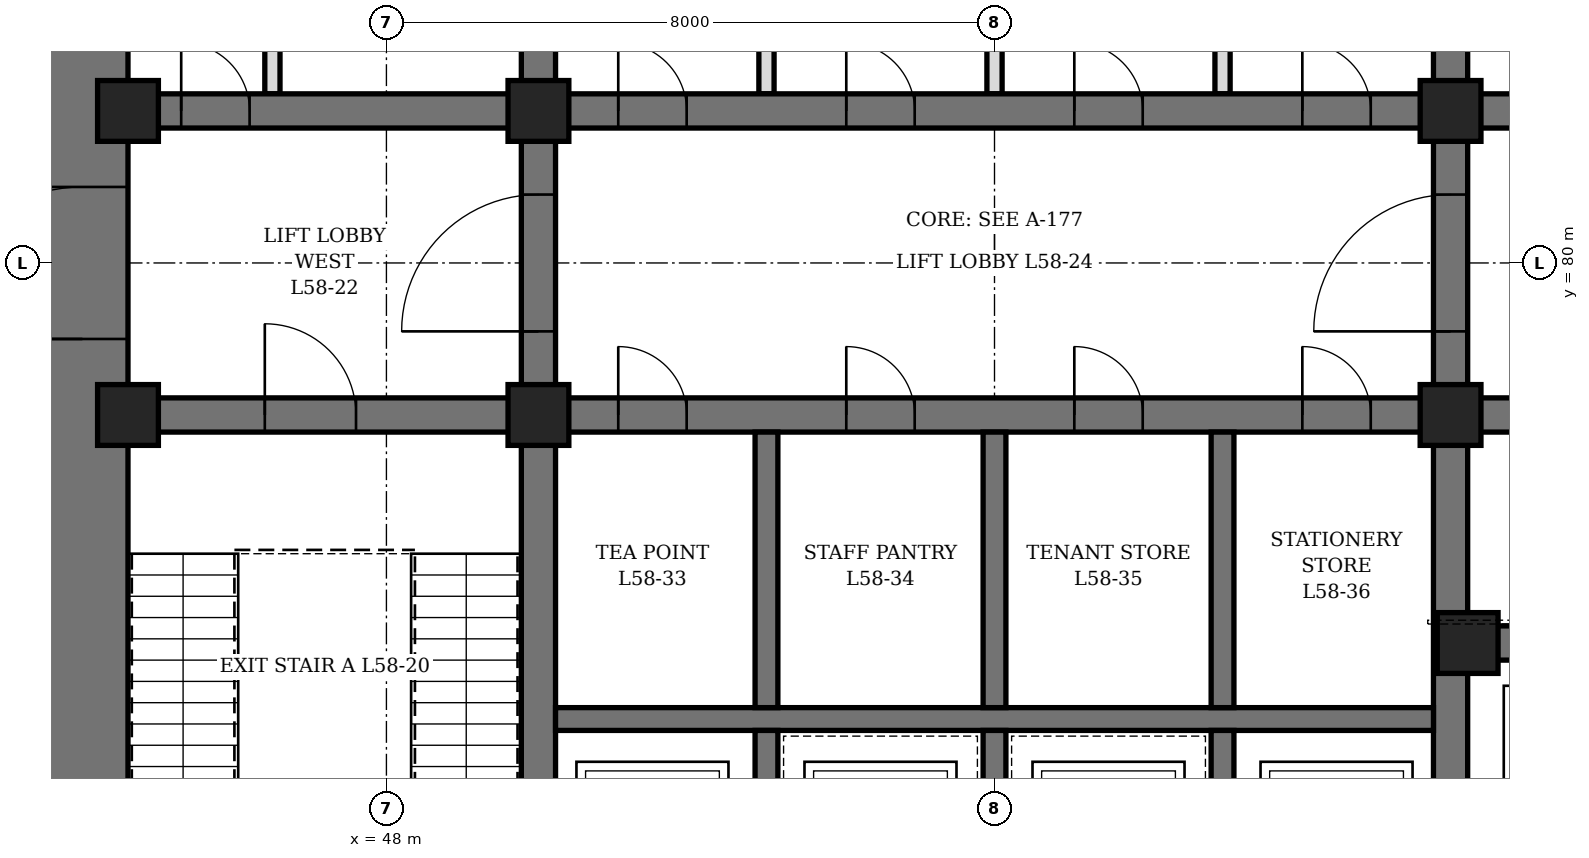
"""IFC4 building model, lengths in metres.
Left out: names, types, materials, properties, quantities, classifications, styles, units other than length and angle.
Written with IfcOpenShell. Run it as: python <this file> out.ifc"""

import sys

from ifc_helpers import new_model, si_unit, direction, frame, frame_2d, origin, origin_2d, place, context, subcontext, project, spatial, rectangle, hollow_rectangle, extrude, element, fill, save


model = new_model("IFC4")
c1 = context("Model", 3, precision=1e-05, world=origin(), true_north=direction((0.0, 1.0)))
c2 = subcontext(c1, "Body", "Model", "MODEL_VIEW")
j1 = project(units=[si_unit("LENGTHUNIT", "METRE"), si_unit("PLANEANGLEUNIT", "RADIAN")], contexts=[c1])
p1 = place(None, origin())
s1 = spatial("IfcSite", under=j1, at=p1, CompositionType="ELEMENT")
p2 = place(p1, origin())
s2 = spatial("IfcBuilding", under=s1, at=p2, CompositionType="ELEMENT")
p3 = place(p2, frame((0.0, 0.0, 258.7)))
s3 = spatial("IfcBuildingStorey", under=s2, at=p3, CompositionType="ELEMENT", Elevation=258.7)
p4 = place(p3, frame((44.0, 70.4, 0.0), z_axis=(0.0, 0.0, 1.0), x_axis=(0.0, 1.0, 0.0)))
e1 = element("IfcWall", 1, at=p4, inside=s3, PredefinedType="SHEAR", context=c2, shape_type="SweptSolid", body=[
    extrude(rectangle(XDim=19.2, YDim=1.2, at=frame_2d((9.6, 0.0))), origin(), (0.0, 0.0, 1.0), 4.2),
])
p5 = place(p4, frame((8.6, 0.0, 0.0)))
e2 = element("IfcOpeningElement", 2, at=p5, cuts=e1, PredefinedType="OPENING", context=c2, shape_type="SweptSolid", body=[
    extrude(rectangle(XDim=2.0, YDim=2.4, at=frame_2d((1.0, 1.2))), frame((0.0, 0.61, 0.0), z_axis=(0.0, -1.0, 0.0), x_axis=(1.0, 0.0, 0.0)), (0.0, 0.0, 1.0), 1.22),
])
p6 = place(p3, frame((50.0, 71.6, 0.0), z_axis=(0.0, 0.0, 1.0), x_axis=(0.0, 1.0, 0.0)))
e3 = element("IfcWall", 3, at=p6, inside=s3, PredefinedType="SHEAR", context=c2, shape_type="SweptSolid", body=[
    extrude(rectangle(XDim=16.8, YDim=0.45, at=frame_2d((8.4, 0.0))), origin(), (0.0, 0.0, 1.0), 4.2),
])
p7 = place(p6, frame((7.5, 0.0, 0.0)))
e4 = element("IfcOpeningElement", 4, at=p7, cuts=e3, PredefinedType="OPENING", context=c2, shape_type="SweptSolid", body=[
    extrude(rectangle(XDim=1.8, YDim=2.4, at=frame_2d((0.9, 1.2))), frame((0.0, 0.235, 0.0), z_axis=(0.0, -1.0, 0.0), x_axis=(1.0, 0.0, 0.0)), (0.0, 0.0, 1.0), 0.47),
])
p8 = place(p3, frame((62.0, 71.6, 0.0), z_axis=(0.0, 0.0, 1.0), x_axis=(0.0, 1.0, 0.0)))
e5 = element("IfcWall", 5, at=p8, inside=s3, PredefinedType="SHEAR", context=c2, shape_type="SweptSolid", body=[
    extrude(rectangle(XDim=16.8, YDim=0.45, at=frame_2d((8.4, 0.0))), origin(), (0.0, 0.0, 1.0), 4.2),
])
p9 = place(p8, frame((7.5, 0.0, 0.0)))
e6 = element("IfcOpeningElement", 6, at=p9, cuts=e5, PredefinedType="OPENING", context=c2, shape_type="SweptSolid", body=[
    extrude(rectangle(XDim=1.8, YDim=2.4, at=frame_2d((0.9, 1.2))), frame((0.0, 0.235, 0.0), z_axis=(0.0, -1.0, 0.0), x_axis=(1.0, 0.0, 0.0)), (0.0, 0.0, 1.0), 0.47),
])
p10 = place(p3, frame((44.6, 78.0, 0.0), z_axis=(0.0, 0.0, 1.0), x_axis=(1.0, 0.0, 0.0)))
e7 = element("IfcWall", 7, at=p10, inside=s3, PredefinedType="SHEAR", context=c2, shape_type="SweptSolid", body=[
    extrude(rectangle(XDim=5.175, YDim=0.45, at=frame_2d((2.587, 0.0))), origin(), (0.0, 0.0, 1.0), 4.2),
])
p11 = place(p10, frame((1.8, 0.0, 0.0)))
e8 = element("IfcOpeningElement", 8, at=p11, cuts=e7, PredefinedType="OPENING", context=c2, shape_type="SweptSolid", body=[
    extrude(rectangle(XDim=1.2, YDim=2.1, at=frame_2d((0.6, 1.05))), frame((0.0, 0.235, 0.0), z_axis=(0.0, -1.0, 0.0), x_axis=(1.0, 0.0, 0.0)), (0.0, 0.0, 1.0), 0.47),
])
p12 = place(p3, frame((44.6, 82.0, 0.0), z_axis=(0.0, 0.0, 1.0), x_axis=(1.0, 0.0, 0.0)))
e9 = element("IfcWall", 9, at=p12, inside=s3, PredefinedType="SHEAR", context=c2, shape_type="SweptSolid", body=[
    extrude(rectangle(XDim=5.175, YDim=0.45, at=frame_2d((2.587, 0.0))), origin(), (0.0, 0.0, 1.0), 4.2),
])
p13 = place(p12, frame((0.7, 0.0, 0.0)))
e10 = element("IfcOpeningElement", 10, at=p13, cuts=e9, PredefinedType="OPENING", context=c2, shape_type="SweptSolid", body=[
    extrude(rectangle(XDim=0.9, YDim=2.1, at=frame_2d((0.45, 1.05))), frame((0.0, 0.235, 0.0), z_axis=(0.0, -1.0, 0.0), x_axis=(1.0, 0.0, 0.0)), (0.0, 0.0, 1.0), 0.47),
])
p14 = place(p3, frame((62.225, 75.0, 0.0), z_axis=(0.0, 0.0, 1.0), x_axis=(1.0, 0.0, 0.0)))
e11 = element("IfcWall", 11, at=p14, inside=s3, PredefinedType="SHEAR", context=c2, shape_type="SweptSolid", body=[
    extrude(rectangle(XDim=5.175, YDim=0.45, at=frame_2d((2.587, 0.0))), origin(), (0.0, 0.0, 1.0), 4.2),
])
p15 = place(p14, frame((0.675, 0.0, 0.0)))
e12 = element("IfcOpeningElement", 12, at=p15, cuts=e11, PredefinedType="OPENING", context=c2, shape_type="SweptSolid", body=[
    extrude(rectangle(XDim=1.2, YDim=2.2, at=frame_2d((0.6, 1.1))), frame((0.0, 0.235, 0.0), z_axis=(0.0, -1.0, 0.0), x_axis=(1.0, 0.0, 0.0)), (0.0, 0.0, 1.0), 0.47),
])
p16 = place(p14, frame((3.425, 0.0, 0.0)))
e13 = element("IfcOpeningElement", 13, at=p16, cuts=e11, PredefinedType="OPENING", context=c2, shape_type="SweptSolid", body=[
    extrude(rectangle(XDim=1.2, YDim=2.2, at=frame_2d((0.6, 1.1))), frame((0.0, 0.235, 0.0), z_axis=(0.0, -1.0, 0.0), x_axis=(1.0, 0.0, 0.0)), (0.0, 0.0, 1.0), 0.47),
])
p17 = place(p3, frame((62.225, 78.0, 0.0), z_axis=(0.0, 0.0, 1.0), x_axis=(1.0, 0.0, 0.0)))
e14 = element("IfcWall", 14, at=p17, inside=s3, PredefinedType="SHEAR", context=c2, shape_type="SweptSolid", body=[
    extrude(rectangle(XDim=5.175, YDim=0.45, at=frame_2d((2.587, 0.0))), origin(), (0.0, 0.0, 1.0), 4.2),
])
p18 = place(p17, frame((2.175, 0.0, 0.0)))
e15 = element("IfcOpeningElement", 15, at=p18, cuts=e14, PredefinedType="OPENING", context=c2, shape_type="SweptSolid", body=[
    extrude(rectangle(XDim=1.2, YDim=2.1, at=frame_2d((0.6, 1.05))), frame((0.0, 0.235, 0.0), z_axis=(0.0, -1.0, 0.0), x_axis=(1.0, 0.0, 0.0)), (0.0, 0.0, 1.0), 0.47),
])
p19 = place(p3, frame((62.225, 82.0, 0.0), z_axis=(0.0, 0.0, 1.0), x_axis=(1.0, 0.0, 0.0)))
e16 = element("IfcWall", 16, at=p19, inside=s3, PredefinedType="SHEAR", context=c2, shape_type="SweptSolid", body=[
    extrude(rectangle(XDim=5.175, YDim=0.45, at=frame_2d((2.587, 0.0))), origin(), (0.0, 0.0, 1.0), 4.2),
])
p20 = place(p19, frame((2.175, 0.0, 0.0)))
e17 = element("IfcOpeningElement", 17, at=p20, cuts=e16, PredefinedType="OPENING", context=c2, shape_type="SweptSolid", body=[
    extrude(rectangle(XDim=1.2, YDim=2.1, at=frame_2d((0.6, 1.05))), frame((0.0, 0.235, 0.0), z_axis=(0.0, -1.0, 0.0), x_axis=(1.0, 0.0, 0.0)), (0.0, 0.0, 1.0), 0.47),
])
p21 = place(p3, frame((50.225, 78.0, 0.0), z_axis=(0.0, 0.0, 1.0), x_axis=(1.0, 0.0, 0.0)))
e18 = element("IfcWall", 18, at=p21, inside=s3, PredefinedType="SHEAR", context=c2, shape_type="SweptSolid", body=[
    extrude(rectangle(XDim=11.55, YDim=0.45, at=frame_2d((5.775, 0.0))), origin(), (0.0, 0.0, 1.0), 4.2),
])
p22 = place(p21, frame((0.825, 0.0, 0.0)))
e19 = element("IfcOpeningElement", 19, at=p22, cuts=e18, PredefinedType="OPENING", context=c2, shape_type="SweptSolid", body=[
    extrude(rectangle(XDim=0.9, YDim=2.1, at=frame_2d((0.45, 1.05))), frame((0.0, 0.235, 0.0), z_axis=(0.0, -1.0, 0.0), x_axis=(1.0, 0.0, 0.0)), (0.0, 0.0, 1.0), 0.47),
])
p23 = place(p21, frame((3.825, 0.0, 0.0)))
e20 = element("IfcOpeningElement", 20, at=p23, cuts=e18, PredefinedType="OPENING", context=c2, shape_type="SweptSolid", body=[
    extrude(rectangle(XDim=0.9, YDim=2.1, at=frame_2d((0.45, 1.05))), frame((0.0, 0.235, 0.0), z_axis=(0.0, -1.0, 0.0), x_axis=(1.0, 0.0, 0.0)), (0.0, 0.0, 1.0), 0.47),
])
p24 = place(p21, frame((6.825, 0.0, 0.0)))
e21 = element("IfcOpeningElement", 21, at=p24, cuts=e18, PredefinedType="OPENING", context=c2, shape_type="SweptSolid", body=[
    extrude(rectangle(XDim=0.9, YDim=2.1, at=frame_2d((0.45, 1.05))), frame((0.0, 0.235, 0.0), z_axis=(0.0, -1.0, 0.0), x_axis=(1.0, 0.0, 0.0)), (0.0, 0.0, 1.0), 0.47),
])
p25 = place(p21, frame((9.825, 0.0, 0.0)))
e22 = element("IfcOpeningElement", 22, at=p25, cuts=e18, PredefinedType="OPENING", context=c2, shape_type="SweptSolid", body=[
    extrude(rectangle(XDim=0.9, YDim=2.1, at=frame_2d((0.45, 1.05))), frame((0.0, 0.235, 0.0), z_axis=(0.0, -1.0, 0.0), x_axis=(1.0, 0.0, 0.0)), (0.0, 0.0, 1.0), 0.47),
])
p26 = place(p3, frame((50.225, 82.0, 0.0), z_axis=(0.0, 0.0, 1.0), x_axis=(1.0, 0.0, 0.0)))
e23 = element("IfcWall", 23, at=p26, inside=s3, PredefinedType="SHEAR", context=c2, shape_type="SweptSolid", body=[
    extrude(rectangle(XDim=11.55, YDim=0.45, at=frame_2d((5.775, 0.0))), origin(), (0.0, 0.0, 1.0), 4.2),
])
p27 = place(p26, frame((0.825, 0.0, 0.0)))
e24 = element("IfcOpeningElement", 24, at=p27, cuts=e23, PredefinedType="OPENING", context=c2, shape_type="SweptSolid", body=[
    extrude(rectangle(XDim=0.9, YDim=2.1, at=frame_2d((0.45, 1.05))), frame((0.0, 0.235, 0.0), z_axis=(0.0, -1.0, 0.0), x_axis=(1.0, 0.0, 0.0)), (0.0, 0.0, 1.0), 0.47),
])
p28 = place(p26, frame((3.825, 0.0, 0.0)))
e25 = element("IfcOpeningElement", 25, at=p28, cuts=e23, PredefinedType="OPENING", context=c2, shape_type="SweptSolid", body=[
    extrude(rectangle(XDim=0.9, YDim=2.1, at=frame_2d((0.45, 1.05))), frame((0.0, 0.235, 0.0), z_axis=(0.0, -1.0, 0.0), x_axis=(1.0, 0.0, 0.0)), (0.0, 0.0, 1.0), 0.47),
])
p29 = place(p26, frame((6.825, 0.0, 0.0)))
e26 = element("IfcOpeningElement", 26, at=p29, cuts=e23, PredefinedType="OPENING", context=c2, shape_type="SweptSolid", body=[
    extrude(rectangle(XDim=0.9, YDim=2.1, at=frame_2d((0.45, 1.05))), frame((0.0, 0.235, 0.0), z_axis=(0.0, -1.0, 0.0), x_axis=(1.0, 0.0, 0.0)), (0.0, 0.0, 1.0), 0.47),
])
p30 = place(p26, frame((9.825, 0.0, 0.0)))
e27 = element("IfcOpeningElement", 27, at=p30, cuts=e23, PredefinedType="OPENING", context=c2, shape_type="SweptSolid", body=[
    extrude(rectangle(XDim=0.9, YDim=2.1, at=frame_2d((0.45, 1.05))), frame((0.0, 0.235, 0.0), z_axis=(0.0, -1.0, 0.0), x_axis=(1.0, 0.0, 0.0)), (0.0, 0.0, 1.0), 0.47),
])
p31 = place(p3, frame((50.225, 74.0, 0.0), z_axis=(0.0, 0.0, 1.0), x_axis=(1.0, 0.0, 0.0)))
e28 = element("IfcWall", 28, at=p31, inside=s3, PredefinedType="SHEAR", context=c2, shape_type="SweptSolid", body=[
    extrude(rectangle(XDim=11.55, YDim=0.3, at=frame_2d((5.775, 0.0))), origin(), (0.0, 0.0, 1.0), 4.2),
])
p32 = place(p3, frame((53.0, 71.6, 0.0), z_axis=(0.0, 0.0, 1.0), x_axis=(0.0, 1.0, 0.0)))
e29 = element("IfcWall", 29, at=p32, inside=s3, PredefinedType="SHEAR", context=c2, shape_type="SweptSolid", body=[
    extrude(rectangle(XDim=2.25, YDim=0.3, at=frame_2d((1.125, 0.0))), origin(), (0.0, 0.0, 1.0), 4.2),
])
p33 = place(p3, frame((53.0, 74.15, 0.0), z_axis=(0.0, 0.0, 1.0), x_axis=(0.0, 1.0, 0.0)))
e30 = element("IfcWall", 30, at=p33, inside=s3, PredefinedType="SHEAR", context=c2, shape_type="SweptSolid", body=[
    extrude(rectangle(XDim=3.625, YDim=0.3, at=frame_2d((1.812, 0.0))), origin(), (0.0, 0.0, 1.0), 4.2),
])
p34 = place(p3, frame((56.0, 71.6, 0.0), z_axis=(0.0, 0.0, 1.0), x_axis=(0.0, 1.0, 0.0)))
e31 = element("IfcWall", 31, at=p34, inside=s3, PredefinedType="SHEAR", context=c2, shape_type="SweptSolid", body=[
    extrude(rectangle(XDim=2.25, YDim=0.3, at=frame_2d((1.125, 0.0))), origin(), (0.0, 0.0, 1.0), 4.2),
])
p35 = place(p3, frame((56.0, 74.15, 0.0), z_axis=(0.0, 0.0, 1.0), x_axis=(0.0, 1.0, 0.0)))
e32 = element("IfcWall", 32, at=p35, inside=s3, PredefinedType="SHEAR", context=c2, shape_type="SweptSolid", body=[
    extrude(rectangle(XDim=3.625, YDim=0.3, at=frame_2d((1.812, 0.0))), origin(), (0.0, 0.0, 1.0), 4.2),
])
p36 = place(p3, frame((59.0, 71.6, 0.0), z_axis=(0.0, 0.0, 1.0), x_axis=(0.0, 1.0, 0.0)))
e33 = element("IfcWall", 33, at=p36, inside=s3, PredefinedType="SHEAR", context=c2, shape_type="SweptSolid", body=[
    extrude(rectangle(XDim=2.25, YDim=0.3, at=frame_2d((1.125, 0.0))), origin(), (0.0, 0.0, 1.0), 4.2),
])
p37 = place(p3, frame((59.0, 74.15, 0.0), z_axis=(0.0, 0.0, 1.0), x_axis=(0.0, 1.0, 0.0)))
e34 = element("IfcWall", 34, at=p37, inside=s3, PredefinedType="SHEAR", context=c2, shape_type="SweptSolid", body=[
    extrude(rectangle(XDim=3.625, YDim=0.3, at=frame_2d((1.812, 0.0))), origin(), (0.0, 0.0, 1.0), 4.2),
])
for number, where, z_axis, x_axis in (
    (35, (44.6, 78.0, 0.0), (0.0, 0.0, 1.0), (1.0, 0.0, 0.0)),
    (36, (44.6, 82.0, 0.0), (0.0, 0.0, 1.0), (1.0, 0.0, 0.0)),
    (37, (50.0, 78.0, 0.0), (0.0, 0.0, 1.0), (1.0, 0.0, 0.0)),
    (38, (50.0, 82.0, 0.0), (0.0, 0.0, 1.0), (1.0, 0.0, 0.0)),
    (39, (62.0, 78.0, 0.0), (0.0, 0.0, 1.0), (1.0, 0.0, 0.0)),
    (40, (62.0, 82.0, 0.0), (0.0, 0.0, 1.0), (1.0, 0.0, 0.0)),
    (41, (62.225, 75.0, 0.0), (0.0, 0.0, 1.0), (1.0, 0.0, 0.0)),
):
    element("IfcColumn", number, at=place(p3, frame(where, z_axis=z_axis, x_axis=x_axis)), inside=s3, PredefinedType="COLUMN", context=c2, shape_type="SweptSolid", body=[
        extrude(hollow_rectangle(XDim=0.8, YDim=0.8, WallThickness=0.1, at=origin_2d()), origin(), (0.0, 0.0, 1.0), 4.2),
    ])
p38 = place(p3, frame((46.5, 82.225, 0.0), z_axis=(0.0, 0.0, 1.0), x_axis=(0.0, 1.0, 0.0)))
e42 = element("IfcWall", 42, at=p38, inside=s3, PredefinedType="PARTITIONING", context=c2, shape_type="SweptSolid", body=[
    extrude(rectangle(XDim=3.05, YDim=0.2, at=frame_2d((1.525, 0.0))), origin(), (0.0, 0.0, 1.0), 4.04),
])
p39 = place(p38, frame((1.075, 0.0, 0.0)))
e43 = element("IfcOpeningElement", 43, at=p39, cuts=e42, PredefinedType="OPENING", context=c2, shape_type="SweptSolid", body=[
    extrude(rectangle(XDim=0.9, YDim=2.1, at=frame_2d((0.45, 1.05))), frame((0.0, 0.11, 0.0), z_axis=(0.0, -1.0, 0.0), x_axis=(1.0, 0.0, 0.0)), (0.0, 0.0, 1.0), 0.22),
])
p40 = place(p3, frame((53.0, 82.225, 0.0), z_axis=(0.0, 0.0, 1.0), x_axis=(0.0, 1.0, 0.0)))
e44 = element("IfcWall", 44, at=p40, inside=s3, PredefinedType="PARTITIONING", context=c2, shape_type="SweptSolid", body=[
    extrude(rectangle(XDim=3.55, YDim=0.2, at=frame_2d((1.775, 0.0))), origin(), (0.0, 0.0, 1.0), 4.04),
])
p41 = place(p3, frame((56.0, 82.225, 0.0), z_axis=(0.0, 0.0, 1.0), x_axis=(0.0, 1.0, 0.0)))
e45 = element("IfcWall", 45, at=p41, inside=s3, PredefinedType="PARTITIONING", context=c2, shape_type="SweptSolid", body=[
    extrude(rectangle(XDim=3.55, YDim=0.2, at=frame_2d((1.775, 0.0))), origin(), (0.0, 0.0, 1.0), 3.14),
])
p42 = place(p3, frame((59.0, 82.225, 0.0), z_axis=(0.0, 0.0, 1.0), x_axis=(0.0, 1.0, 0.0)))
e46 = element("IfcWall", 46, at=p42, inside=s3, PredefinedType="PARTITIONING", context=c2, shape_type="SweptSolid", body=[
    extrude(rectangle(XDim=3.55, YDim=0.2, at=frame_2d((1.775, 0.0))), origin(), (0.0, 0.0, 1.0), 4.04),
])
p43 = place(p13, origin())
e47 = element("IfcDoor", 47, at=p43, inside=s3, OperationType="SINGLE_SWING_LEFT", PredefinedType="DOOR", context=c2, shape_type="SweptSolid", body=[
    extrude(rectangle(XDim=0.9, YDim=2.1, at=frame_2d((0.45, 1.05))), frame((0.0, 0.225, 0.0), z_axis=(0.0, -1.0, 0.0), x_axis=(1.0, 0.0, 0.0)), (0.0, 0.0, 1.0), 0.449),
])
fill(e10, e47)
p44 = place(p22, origin())
e48 = element("IfcDoor", 48, at=p44, inside=s3, OperationType="SINGLE_SWING_LEFT", PredefinedType="DOOR", context=c2, shape_type="SweptSolid", body=[
    extrude(rectangle(XDim=0.9, YDim=2.1, at=frame_2d((0.45, 1.05))), frame((0.0, 0.225, 0.0), z_axis=(0.0, -1.0, 0.0), x_axis=(1.0, 0.0, 0.0)), (0.0, 0.0, 1.0), 0.449),
])
fill(e19, e48)
p45 = place(p23, origin())
e49 = element("IfcDoor", 49, at=p45, inside=s3, OperationType="SINGLE_SWING_LEFT", PredefinedType="DOOR", context=c2, shape_type="SweptSolid", body=[
    extrude(rectangle(XDim=0.9, YDim=2.1, at=frame_2d((0.45, 1.05))), frame((0.0, 0.225, 0.0), z_axis=(0.0, -1.0, 0.0), x_axis=(1.0, 0.0, 0.0)), (0.0, 0.0, 1.0), 0.449),
])
fill(e20, e49)
p46 = place(p24, origin())
e50 = element("IfcDoor", 50, at=p46, inside=s3, OperationType="SINGLE_SWING_LEFT", PredefinedType="DOOR", context=c2, shape_type="SweptSolid", body=[
    extrude(rectangle(XDim=0.9, YDim=2.1, at=frame_2d((0.45, 1.05))), frame((0.0, 0.225, 0.0), z_axis=(0.0, -1.0, 0.0), x_axis=(1.0, 0.0, 0.0)), (0.0, 0.0, 1.0), 0.449),
])
fill(e21, e50)
p47 = place(p25, origin())
e51 = element("IfcDoor", 51, at=p47, inside=s3, OperationType="SINGLE_SWING_LEFT", PredefinedType="DOOR", context=c2, shape_type="SweptSolid", body=[
    extrude(rectangle(XDim=0.9, YDim=2.1, at=frame_2d((0.45, 1.05))), frame((0.0, 0.225, 0.0), z_axis=(0.0, -1.0, 0.0), x_axis=(1.0, 0.0, 0.0)), (0.0, 0.0, 1.0), 0.449),
])
fill(e22, e51)
p48 = place(p27, origin())
e52 = element("IfcDoor", 52, at=p48, inside=s3, OperationType="SINGLE_SWING_LEFT", PredefinedType="DOOR", context=c2, shape_type="SweptSolid", body=[
    extrude(rectangle(XDim=0.9, YDim=2.1, at=frame_2d((0.45, 1.05))), frame((0.0, 0.225, 0.0), z_axis=(0.0, -1.0, 0.0), x_axis=(1.0, 0.0, 0.0)), (0.0, 0.0, 1.0), 0.449),
])
fill(e24, e52)
p49 = place(p28, origin())
e53 = element("IfcDoor", 53, at=p49, inside=s3, OperationType="SINGLE_SWING_LEFT", PredefinedType="DOOR", context=c2, shape_type="SweptSolid", body=[
    extrude(rectangle(XDim=0.9, YDim=2.1, at=frame_2d((0.45, 1.05))), frame((0.0, 0.225, 0.0), z_axis=(0.0, -1.0, 0.0), x_axis=(1.0, 0.0, 0.0)), (0.0, 0.0, 1.0), 0.449),
])
fill(e25, e53)
p50 = place(p29, origin())
e54 = element("IfcDoor", 54, at=p50, inside=s3, OperationType="SINGLE_SWING_LEFT", PredefinedType="DOOR", context=c2, shape_type="SweptSolid", body=[
    extrude(rectangle(XDim=0.9, YDim=2.1, at=frame_2d((0.45, 1.05))), frame((0.0, 0.225, 0.0), z_axis=(0.0, -1.0, 0.0), x_axis=(1.0, 0.0, 0.0)), (0.0, 0.0, 1.0), 0.449),
])
fill(e26, e54)
p51 = place(p30, origin())
e55 = element("IfcDoor", 55, at=p51, inside=s3, OperationType="SINGLE_SWING_LEFT", PredefinedType="DOOR", context=c2, shape_type="SweptSolid", body=[
    extrude(rectangle(XDim=0.9, YDim=2.1, at=frame_2d((0.45, 1.05))), frame((0.0, 0.225, 0.0), z_axis=(0.0, -1.0, 0.0), x_axis=(1.0, 0.0, 0.0)), (0.0, 0.0, 1.0), 0.449),
])
fill(e27, e55)
p52 = place(p11, origin())
e56 = element("IfcDoor", 56, at=p52, inside=s3, OperationType="SINGLE_SWING_LEFT", PredefinedType="DOOR", context=c2, shape_type="SweptSolid", body=[
    extrude(rectangle(XDim=1.2, YDim=2.1, at=frame_2d((0.6, 1.05))), frame((0.0, 0.225, 0.0), z_axis=(0.0, -1.0, 0.0), x_axis=(1.0, 0.0, 0.0)), (0.0, 0.0, 1.0), 0.449),
])
fill(e8, e56)
p53 = place(p5, origin())
e57 = element("IfcDoor", 57, at=p53, inside=s3, OperationType="DOUBLE_DOOR_SINGLE_SWING", PredefinedType="DOOR", context=c2, shape_type="SweptSolid", body=[
    extrude(rectangle(XDim=2.0, YDim=2.4, at=frame_2d((1.0, 1.2))), frame((0.0, 0.35, 0.0), z_axis=(0.0, -1.0, 0.0), x_axis=(1.0, 0.0, 0.0)), (0.0, 0.0, 1.0), 0.7),
])
fill(e2, e57)
p54 = place(p7, origin())
e58 = element("IfcDoor", 58, at=p54, inside=s3, OperationType="DOUBLE_DOOR_SINGLE_SWING", PredefinedType="DOOR", context=c2, shape_type="SweptSolid", body=[
    extrude(rectangle(XDim=1.8, YDim=2.4, at=frame_2d((0.9, 1.2))), frame((0.0, 0.225, 0.0), z_axis=(0.0, -1.0, 0.0), x_axis=(1.0, 0.0, 0.0)), (0.0, 0.0, 1.0), 0.449),
])
fill(e4, e58)
p55 = place(p9, origin())
e59 = element("IfcDoor", 59, at=p55, inside=s3, OperationType="DOUBLE_DOOR_SINGLE_SWING", PredefinedType="DOOR", context=c2, shape_type="SweptSolid", body=[
    extrude(rectangle(XDim=1.8, YDim=2.4, at=frame_2d((0.9, 1.2))), frame((0.0, 0.225, 0.0), z_axis=(0.0, -1.0, 0.0), x_axis=(1.0, 0.0, 0.0)), (0.0, 0.0, 1.0), 0.449),
])
fill(e6, e59)
save(model, sys.argv[1])
